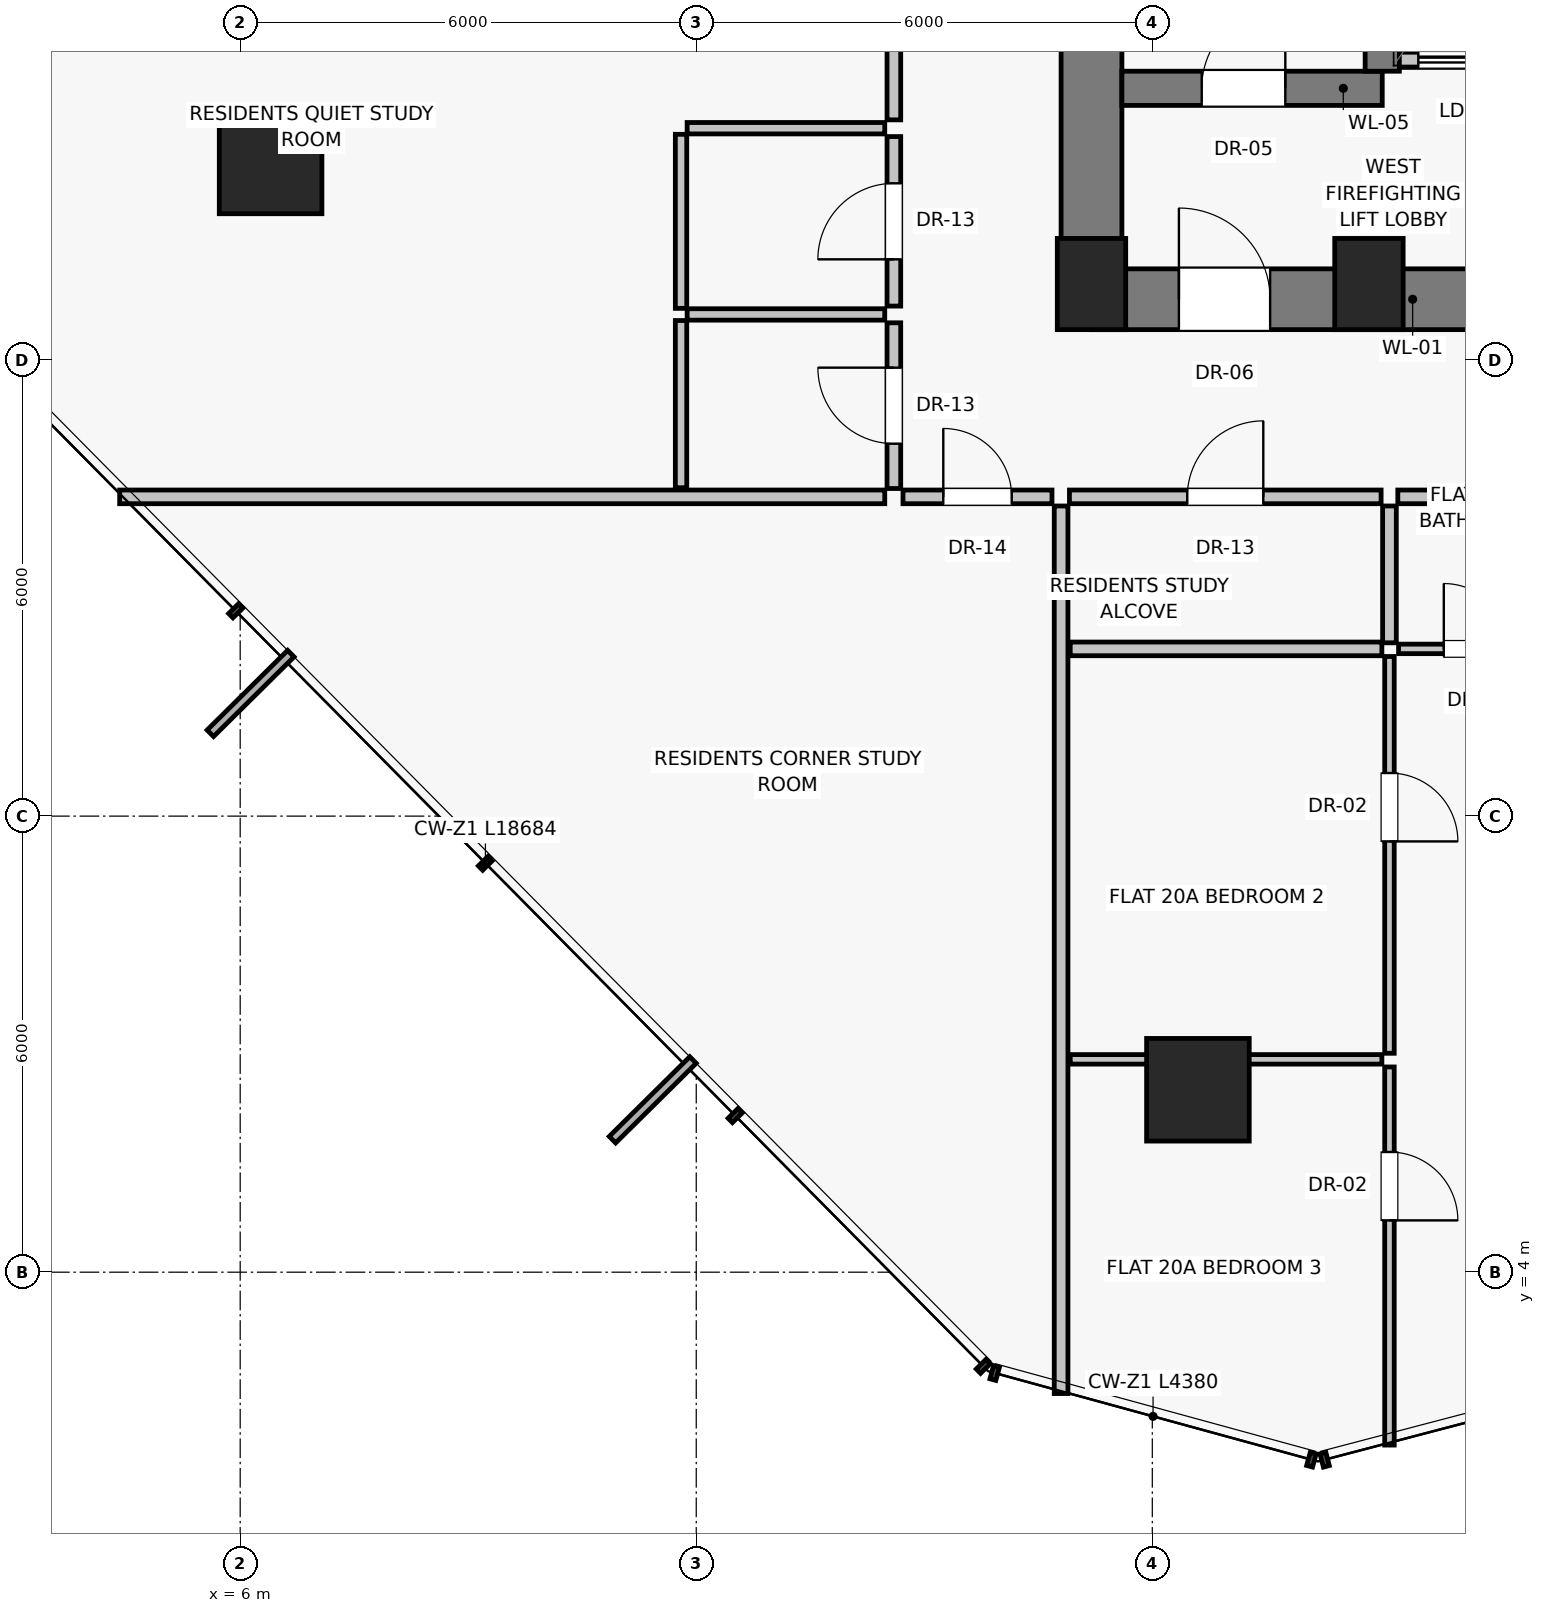
"""IFC4 building model, lengths in metres.
Left out: names, types, materials, properties, quantities, classifications, styles, units other than length and angle.
Written with IfcOpenShell. Run it as: python <this file> out.ifc"""

import sys

from ifc_helpers import new_model, si_unit, direction, frame, frame_2d, origin, origin_2d, place, context, subcontext, project, spatial, rectangle, extrude, source, transform, mapped, element, fill, save


model = new_model("IFC4")
c1 = context("Model", 3, precision=1e-05, world=origin(), true_north=direction((0.0, 1.0)))
c2 = subcontext(c1, "Body", "Model", "MODEL_VIEW")
j1 = project(units=[si_unit("LENGTHUNIT", "METRE"), si_unit("PLANEANGLEUNIT", "RADIAN")], contexts=[c1])
p1 = place(None, origin())
s1 = spatial("IfcSite", under=j1, at=p1, CompositionType="ELEMENT")
p2 = place(p1, origin())
s2 = spatial("IfcBuilding", under=s1, at=p2, CompositionType="ELEMENT")
p3 = place(p2, frame((0.0, 0.0, 73.85)))
s3 = spatial("IfcBuildingStorey", under=s2, at=p3, CompositionType="ELEMENT", Elevation=73.85)
for number, where, z_axis, x_axis in (
    (1, (17.2, 17.0, 0.0), (0.0, 0.0, 1.0), (1.0, 0.0, 0.0)),
    (2, (20.85, 17.0, 0.0), (0.0, 0.0, 1.0), (1.0, 0.0, 0.0)),
):
    element("IfcColumn", number, at=place(p3, frame(where, z_axis=z_axis, x_axis=x_axis)), inside=s3, PredefinedType="PILASTER", context=c2, shape_type="SweptSolid", body=[
        extrude(rectangle(XDim=0.9, YDim=1.2, at=origin_2d()), origin(), (0.0, 0.0, 1.0), 3.25),
    ])
for number, where, z_axis, x_axis in (
    (3, (6.4, 18.6, 0.0), (0.0, 0.0, 1.0), (1.0, 0.0, 0.0)),
    (4, (18.6, 6.4, 0.0), (0.0, 0.0, 1.0), (1.0, 0.0, 0.0)),
):
    element("IfcColumn", number, at=place(p3, frame(where, z_axis=z_axis, x_axis=x_axis)), inside=s3, PredefinedType="COLUMN", context=c2, shape_type="SweptSolid", body=[
        extrude(rectangle(XDim=1.35, YDim=1.35, at=origin_2d()), origin(), (0.0, 0.0, 1.0), 3.25),
    ])
p4 = place(p3, frame((17.2, 16.8, 0.0), z_axis=(0.0, 0.0, 1.0), x_axis=(0.0, 1.0, 0.0)))
e5 = element("IfcWall", 5, at=p4, inside=s3, PredefinedType="SHEAR", context=c2, shape_type="SweptSolid", body=[
    extrude(rectangle(XDim=14.2, YDim=0.8, at=frame_2d((7.1, 0.0))), origin(), (0.0, 0.0, 1.0), 3.0),
])
p5 = place(p3, frame((17.2, 16.8, 0.0), z_axis=(0.0, 0.0, 1.0), x_axis=(1.0, 0.0, 0.0)))
e6 = element("IfcWall", 6, at=p5, inside=s3, PredefinedType="SHEAR", context=c2, shape_type="SweptSolid", body=[
    extrude(rectangle(XDim=5.85, YDim=0.8, at=frame_2d((2.925, 0.0))), origin(), (0.0, 0.0, 1.0), 3.0),
])
p6 = place(p5, frame((1.15, 0.0, 0.0)))
e7 = element("IfcOpeningElement", 7, at=p6, cuts=e6, PredefinedType="OPENING", context=c2, shape_type="SweptSolid", body=[
    extrude(rectangle(XDim=1.2, YDim=2.03, at=frame_2d((0.6, 1.015))), frame((0.0, 0.41, 0.0), z_axis=(0.0, -1.0, 0.0), x_axis=(1.0, 0.0, 0.0)), (0.0, 0.0, 1.0), 0.82),
])
p7 = place(p3, frame((17.6, 19.575, 0.0), z_axis=(0.0, 0.0, 1.0), x_axis=(1.0, 0.0, 0.0)))
e8 = element("IfcWall", 8, at=p7, inside=s3, PredefinedType="SHEAR", context=c2, shape_type="SweptSolid", body=[
    extrude(rectangle(XDim=3.425, YDim=0.45, at=frame_2d((1.712, 0.0))), origin(), (0.0, 0.0, 1.0), 3.0),
])
p8 = place(p7, frame((1.05, 0.0, 0.0)))
e9 = element("IfcOpeningElement", 9, at=p8, cuts=e8, PredefinedType="OPENING", context=c2, shape_type="SweptSolid", body=[
    extrude(rectangle(XDim=1.1, YDim=2.03, at=frame_2d((0.55, 1.015))), frame((0.0, 0.235, 0.0), z_axis=(0.0, -1.0, 0.0), x_axis=(1.0, 0.0, 0.0)), (0.0, 0.0, 1.0), 0.47),
])
p9 = place(p3, frame((21.2, 19.95, 0.0), z_axis=(0.0, 0.0, 1.0), x_axis=(1.0, 0.0, 0.0)))
e10 = element("IfcWall", 10, at=p9, inside=s3, PredefinedType="SOLIDWALL", context=c2, shape_type="SweptSolid", body=[
    extrude(rectangle(XDim=1.85, YDim=0.2, at=frame_2d((0.925, 0.0))), origin(), (0.0, 0.0, 1.0), 3.0),
])
p10 = place(p9, frame((0.3, 0.0, 0.0)))
e11 = element("IfcOpeningElement", 11, at=p10, cuts=e10, PredefinedType="OPENING", context=c2, shape_type="SweptSolid", body=[
    extrude(rectangle(XDim=1.3, YDim=2.25, at=frame_2d((0.65, 1.125))), frame((0.0, 0.11, 0.0), z_axis=(0.0, -1.0, 0.0), x_axis=(1.0, 0.0, 0.0)), (0.0, 0.0, 1.0), 0.22),
])
p11 = place(p3, frame((21.025, 19.8, 0.0), z_axis=(0.0, 0.0, 1.0), x_axis=(0.0, 1.0, 0.0)))
e12 = element("IfcWall", 12, at=p11, inside=s3, PredefinedType="SHEAR", context=c2, shape_type="SweptSolid", body=[
    extrude(rectangle(XDim=8.825, YDim=0.45, at=frame_2d((4.413, 0.0))), origin(), (0.0, 0.0, 1.0), 3.0),
])
p12 = place(p3, frame((16.8, 14.08, 0.0), z_axis=(0.0, 0.0, 1.0), x_axis=(0.0, -1.0, 0.0)))
e13 = element("IfcWall", 13, at=p12, inside=s3, PredefinedType="PARTITIONING", context=c2, shape_type="SweptSolid", body=[
    extrude(rectangle(XDim=11.677, YDim=0.18, at=frame_2d((5.838, 0.0))), origin(), (0.0, 0.0, 1.0), 3.0),
])
p13 = place(p3, frame((16.91, 14.2, 0.0), z_axis=(0.0, 0.0, 1.0), x_axis=(1.0, 0.0, 0.0)))
e14 = element("IfcWall", 14, at=p13, inside=s3, PredefinedType="PARTITIONING", context=c2, shape_type="SweptSolid", body=[
    extrude(rectangle(XDim=4.1, YDim=0.18, at=frame_2d((2.05, 0.0))), origin(), (0.0, 0.0, 1.0), 3.0),
])
p14 = place(p13, frame((1.55, 0.0, 0.0)))
e15 = element("IfcOpeningElement", 15, at=p14, cuts=e14, PredefinedType="OPENING", context=c2, shape_type="SweptSolid", body=[
    extrude(rectangle(XDim=1.0, YDim=2.01, at=frame_2d((0.5, 1.005))), frame((0.0, 0.1, 0.0), z_axis=(0.0, -1.0, 0.0), x_axis=(1.0, 0.0, 0.0)), (0.0, 0.0, 1.0), 0.2),
])
p15 = place(p3, frame((21.23, 14.2, 0.0), z_axis=(0.0, 0.0, 1.0), x_axis=(1.0, 0.0, 0.0)))
e16 = element("IfcWall", 16, at=p15, inside=s3, PredefinedType="PARTITIONING", context=c2, shape_type="SweptSolid", body=[
    extrude(rectangle(XDim=9.86, YDim=0.18, at=frame_2d((4.93, 0.0))), origin(), (0.0, 0.0, 1.0), 3.0),
])
p16 = place(p15, frame((3.276, 0.0, 0.0)))
e17 = element("IfcOpeningElement", 17, at=p16, cuts=e16, PredefinedType="OPENING", context=c2, shape_type="SweptSolid", body=[
    extrude(rectangle(XDim=0.95, YDim=2.02, at=frame_2d((0.475, 1.01))), frame((0.0, 0.1, 0.0), z_axis=(0.0, -1.0, 0.0), x_axis=(1.0, 0.0, 0.0)), (0.0, 0.0, 1.0), 0.2),
])
p17 = place(p3, frame((16.92, 6.8, 0.0), z_axis=(0.0, 0.0, 1.0), x_axis=(1.0, 0.0, 0.0)))
e18 = element("IfcWall", 18, at=p17, inside=s3, PredefinedType="PARTITIONING", context=c2, shape_type="SweptSolid", body=[
    extrude(rectangle(XDim=4.1, YDim=0.125, at=frame_2d((2.05, 0.0))), origin(), (0.0, 0.0, 1.0), 2.1),
])
p18 = place(p3, frame((21.12, 6.7, 0.0), z_axis=(0.0, 0.0, 1.0), x_axis=(0.0, -1.0, 0.0)))
e19 = element("IfcWall", 19, at=p18, inside=s3, PredefinedType="PARTITIONING", context=c2, shape_type="SweptSolid", body=[
    extrude(rectangle(XDim=4.974, YDim=0.125, at=frame_2d((2.487, 0.0))), origin(), (0.0, 0.0, 1.0), 3.0),
])
p19 = place(p18, frame((1.119, 0.0, 0.0)))
e20 = element("IfcOpeningElement", 20, at=p19, cuts=e19, PredefinedType="OPENING", context=c2, shape_type="SweptSolid", body=[
    extrude(rectangle(XDim=0.9, YDim=2.01, at=frame_2d((0.45, 1.005))), frame((0.0, 0.073, 0.0), z_axis=(0.0, -1.0, 0.0), x_axis=(1.0, 0.0, 0.0)), (0.0, 0.0, 1.0), 0.145),
])
p20 = place(p3, frame((16.92, 12.2, 0.0), z_axis=(0.0, 0.0, 1.0), x_axis=(1.0, 0.0, 0.0)))
e21 = element("IfcWall", 21, at=p20, inside=s3, PredefinedType="PARTITIONING", context=c2, shape_type="SweptSolid", body=[
    extrude(rectangle(XDim=4.1, YDim=0.18, at=frame_2d((2.05, 0.0))), origin(), (0.0, 0.0, 1.0), 3.0),
])
p21 = place(p3, frame((21.12, 14.08, 0.0), z_axis=(0.0, 0.0, 1.0), x_axis=(0.0, -1.0, 0.0)))
e22 = element("IfcWall", 22, at=p21, inside=s3, PredefinedType="PARTITIONING", context=c2, shape_type="SweptSolid", body=[
    extrude(rectangle(XDim=1.8, YDim=0.18, at=frame_2d((0.9, 0.0))), origin(), (0.0, 0.0, 1.0), 3.0),
])
p22 = place(p3, frame((21.12, 12.1, 0.0), z_axis=(0.0, 0.0, 1.0), x_axis=(0.0, -1.0, 0.0)))
e23 = element("IfcWall", 23, at=p22, inside=s3, PredefinedType="PARTITIONING", context=c2, shape_type="SweptSolid", body=[
    extrude(rectangle(XDim=5.22, YDim=0.125, at=frame_2d((2.61, 0.0))), origin(), (0.0, 0.0, 1.0), 3.0),
])
p23 = place(p22, frame((1.533, 0.0, 0.0)))
e24 = element("IfcOpeningElement", 24, at=p23, cuts=e23, PredefinedType="OPENING", context=c2, shape_type="SweptSolid", body=[
    extrude(rectangle(XDim=0.9, YDim=2.01, at=frame_2d((0.45, 1.005))), frame((0.0, 0.073, 0.0), z_axis=(0.0, -1.0, 0.0), x_axis=(1.0, 0.0, 0.0)), (0.0, 0.0, 1.0), 0.145),
])
p24 = place(p3, frame((21.24, 12.2, 0.0), z_axis=(0.0, 0.0, 1.0), x_axis=(1.0, 0.0, 0.0)))
e25 = element("IfcWall", 25, at=p24, inside=s3, PredefinedType="PARTITIONING", context=c2, shape_type="SweptSolid", body=[
    extrude(rectangle(XDim=2.05, YDim=0.125, at=frame_2d((1.025, 0.0))), origin(), (0.0, 0.0, 1.0), 3.0),
])
p25 = place(p24, frame((0.595, 0.0, 0.0)))
e26 = element("IfcOpeningElement", 26, at=p25, cuts=e25, PredefinedType="OPENING", context=c2, shape_type="SweptSolid", body=[
    extrude(rectangle(XDim=0.86, YDim=2.01, at=frame_2d((0.43, 1.005))), frame((0.0, 0.073, 0.0), z_axis=(0.0, -1.0, 0.0), x_axis=(1.0, 0.0, 0.0)), (0.0, 0.0, 1.0), 0.145),
])
p26 = place(p3, frame((14.48, 14.2, 0.0), z_axis=(0.0, 0.0, 1.0), x_axis=(-1.0, 0.0, 0.0)))
e27 = element("IfcWall", 27, at=p26, inside=s3, PredefinedType="PARTITIONING", context=c2, shape_type="SweptSolid", body=[
    extrude(rectangle(XDim=10.065, YDim=0.18, at=frame_2d((5.033, 0.0))), origin(), (0.0, 0.0, 1.0), 3.0),
])
p27 = place(p3, frame((14.6, 14.31, 0.0), z_axis=(0.0, 0.0, 1.0), x_axis=(0.0, 1.0, 0.0)))
e28 = element("IfcWall", 28, at=p27, inside=s3, PredefinedType="PARTITIONING", context=c2, shape_type="SweptSolid", body=[
    extrude(rectangle(XDim=2.18, YDim=0.18, at=frame_2d((1.09, 0.0))), origin(), (0.0, 0.0, 1.0), 3.0),
])
p28 = place(p27, frame((0.59, 0.0, 0.0)))
e29 = element("IfcOpeningElement", 29, at=p28, cuts=e28, PredefinedType="OPENING", context=c2, shape_type="SweptSolid", body=[
    extrude(rectangle(XDim=1.0, YDim=2.01, at=frame_2d((0.5, 1.005))), frame((0.0, 0.1, 0.0), z_axis=(0.0, -1.0, 0.0), x_axis=(1.0, 0.0, 0.0)), (0.0, 0.0, 1.0), 0.2),
])
p29 = place(p3, frame((14.6, 16.71, 0.0), z_axis=(0.0, 0.0, 1.0), x_axis=(0.0, 1.0, 0.0)))
e30 = element("IfcWall", 30, at=p29, inside=s3, PredefinedType="PARTITIONING", context=c2, shape_type="SweptSolid", body=[
    extrude(rectangle(XDim=2.23, YDim=0.18, at=frame_2d((1.115, 0.0))), origin(), (0.0, 0.0, 1.0), 3.0),
])
p30 = place(p29, frame((0.615, 0.0, 0.0)))
e31 = element("IfcOpeningElement", 31, at=p30, cuts=e30, PredefinedType="OPENING", context=c2, shape_type="SweptSolid", body=[
    extrude(rectangle(XDim=1.0, YDim=2.01, at=frame_2d((0.5, 1.005))), frame((0.0, 0.1, 0.0), z_axis=(0.0, -1.0, 0.0), x_axis=(1.0, 0.0, 0.0)), (0.0, 0.0, 1.0), 0.2),
])
p31 = place(p3, frame((14.6, 19.16, 0.0), z_axis=(0.0, 0.0, 1.0), x_axis=(0.0, 1.0, 0.0)))
e32 = element("IfcWall", 32, at=p31, inside=s3, PredefinedType="PARTITIONING", context=c2, shape_type="SweptSolid", body=[
    extrude(rectangle(XDim=4.73, YDim=0.18, at=frame_2d((2.365, 0.0))), origin(), (0.0, 0.0, 1.0), 3.0),
])
p32 = place(p31, frame((1.865, 0.0, 0.0)))
e33 = element("IfcOpeningElement", 33, at=p32, cuts=e32, PredefinedType="OPENING", context=c2, shape_type="SweptSolid", body=[
    extrude(rectangle(XDim=1.0, YDim=2.01, at=frame_2d((0.5, 1.005))), frame((0.0, 0.1, 0.0), z_axis=(0.0, -1.0, 0.0), x_axis=(1.0, 0.0, 0.0)), (0.0, 0.0, 1.0), 0.2),
])
for number, where, z_axis, x_axis in (
    (34, (14.48, 16.6, 0.0), (0.0, 0.0, 1.0), (-1.0, 0.0, 0.0)),
    (35, (14.48, 19.05, 0.0), (0.0, 0.0, 1.0), (-1.0, 0.0, 0.0)),
):
    element("IfcWall", number, at=place(p3, frame(where, z_axis=z_axis, x_axis=x_axis)), inside=s3, PredefinedType="PARTITIONING", context=c2, shape_type="SweptSolid", body=[
        extrude(rectangle(XDim=2.6, YDim=0.15, at=frame_2d((1.3, 0.0))), origin(), (0.0, 0.0, 1.0), 3.0),
    ])
p33 = place(p3, frame((11.8, 14.32, 0.0), z_axis=(0.0, 0.0, 1.0), x_axis=(0.0, 1.0, 0.0)))
e36 = element("IfcWall", 36, at=p33, inside=s3, PredefinedType="PARTITIONING", context=c2, shape_type="SweptSolid", body=[
    extrude(rectangle(XDim=2.2, YDim=0.15, at=frame_2d((1.1, 0.0))), origin(), (0.0, 0.0, 1.0), 3.0),
])
p34 = place(p3, frame((11.8, 16.68, 0.0), z_axis=(0.0, 0.0, 1.0), x_axis=(0.0, 1.0, 0.0)))
e37 = element("IfcWall", 37, at=p34, inside=s3, PredefinedType="PARTITIONING", context=c2, shape_type="SweptSolid", body=[
    extrude(rectangle(XDim=2.29, YDim=0.15, at=frame_2d((1.145, 0.0))), origin(), (0.0, 0.0, 1.0), 2.58),
])
p35 = place(p3, frame((14.72, 14.2, 0.0), z_axis=(0.0, 0.0, 1.0), x_axis=(1.0, 0.0, 0.0)))
e38 = element("IfcWall", 38, at=p35, inside=s3, PredefinedType="PARTITIONING", context=c2, shape_type="SweptSolid", body=[
    extrude(rectangle(XDim=1.96, YDim=0.18, at=frame_2d((0.98, 0.0))), origin(), (0.0, 0.0, 1.0), 3.0),
])
p36 = place(p35, frame((0.53, 0.0, 0.0)))
e39 = element("IfcOpeningElement", 39, at=p36, cuts=e38, PredefinedType="OPENING", context=c2, shape_type="SweptSolid", body=[
    extrude(rectangle(XDim=0.9, YDim=2.01, at=frame_2d((0.45, 1.005))), frame((0.0, 0.1, 0.0), z_axis=(0.0, -1.0, 0.0), x_axis=(1.0, 0.0, 0.0)), (0.0, 0.0, 1.0), 0.2),
])
m1 = source(origin(), c2, "Body", "SweptSolid", [
    extrude(rectangle(XDim=1.2, YDim=2.03, at=frame_2d((0.6, 1.015))), frame((0.0, 0.025, 0.0), z_axis=(0.0, -1.0, 0.0), x_axis=(1.0, 0.0, 0.0)), (0.0, 0.0, 1.0), 0.05),
])
p37 = place(p6, origin())
e40 = element("IfcDoor", 40, at=p37, inside=s3, OperationType="SINGLE_SWING_LEFT", PredefinedType="DOOR", context=c2, shape_type="MappedRepresentation", body=[
    mapped(m1, transform((0.0, 0.0, 0.0), scale=1.0)),
])
fill(e7, e40)
m2 = source(origin(), c2, "Body", "SweptSolid", [
    extrude(rectangle(XDim=1.1, YDim=2.03, at=frame_2d((0.55, 1.015))), frame((0.0, 0.025, 0.0), z_axis=(0.0, -1.0, 0.0), x_axis=(1.0, 0.0, 0.0)), (0.0, 0.0, 1.0), 0.05),
])
p38 = place(p8, origin())
e41 = element("IfcDoor", 41, at=p38, inside=s3, OperationType="SINGLE_SWING_RIGHT", PredefinedType="DOOR", context=c2, shape_type="MappedRepresentation", body=[
    mapped(m2, transform((0.0, 0.0, 0.0), scale=1.0)),
])
fill(e9, e41)
m3 = source(origin(), c2, "Body", "SweptSolid", [
    extrude(rectangle(XDim=1.3, YDim=2.25, at=frame_2d((0.65, 1.125))), frame((0.0, 0.025, 0.0), z_axis=(0.0, -1.0, 0.0), x_axis=(1.0, 0.0, 0.0)), (0.0, 0.0, 1.0), 0.05),
])
p39 = place(p10, origin())
e42 = element("IfcDoor", 42, at=p39, inside=s3, OperationType="SLIDING_TO_LEFT", PredefinedType="DOOR", context=c2, shape_type="MappedRepresentation", body=[
    mapped(m3, transform((0.0, 0.0, 0.0), scale=1.0)),
])
fill(e11, e42)
m4 = source(origin(), c2, "Body", "SweptSolid", [
    extrude(rectangle(XDim=1.0, YDim=2.01, at=frame_2d((0.5, 1.005))), frame((0.0, 0.025, 0.0), z_axis=(0.0, -1.0, 0.0), x_axis=(1.0, 0.0, 0.0)), (0.0, 0.0, 1.0), 0.05),
])
p40 = place(p14, origin())
e43 = element("IfcDoor", 43, at=p40, inside=s3, OperationType="SINGLE_SWING_RIGHT", PredefinedType="DOOR", context=c2, shape_type="MappedRepresentation", body=[
    mapped(m4, transform((0.0, 0.0, 0.0), scale=1.0)),
])
fill(e15, e43)
m5 = source(origin(), c2, "Body", "SweptSolid", [
    extrude(rectangle(XDim=0.9, YDim=2.01, at=frame_2d((0.45, 1.005))), frame((0.0, 0.025, 0.0), z_axis=(0.0, -1.0, 0.0), x_axis=(1.0, 0.0, 0.0)), (0.0, 0.0, 1.0), 0.05),
])
p41 = place(p19, origin())
e44 = element("IfcDoor", 44, at=p41, inside=s3, OperationType="SINGLE_SWING_RIGHT", PredefinedType="DOOR", context=c2, shape_type="MappedRepresentation", body=[
    mapped(m5, transform((0.0, 0.0, 0.0), scale=1.0)),
])
fill(e20, e44)
p42 = place(p23, origin())
e45 = element("IfcDoor", 45, at=p42, inside=s3, OperationType="SINGLE_SWING_RIGHT", PredefinedType="DOOR", context=c2, shape_type="MappedRepresentation", body=[
    mapped(m5, transform((0.0, 0.0, 0.0), scale=1.0)),
])
fill(e24, e45)
m6 = source(origin(), c2, "Body", "SweptSolid", [
    extrude(rectangle(XDim=0.86, YDim=2.01, at=frame_2d((0.43, 1.005))), frame((0.0, 0.025, 0.0), z_axis=(0.0, -1.0, 0.0), x_axis=(1.0, 0.0, 0.0)), (0.0, 0.0, 1.0), 0.05),
])
p43 = place(p25, origin())
e46 = element("IfcDoor", 46, at=p43, inside=s3, OperationType="SINGLE_SWING_LEFT", PredefinedType="DOOR", context=c2, shape_type="MappedRepresentation", body=[
    mapped(m6, transform((0.0, 0.0, 0.0), scale=1.0)),
])
fill(e26, e46)
p44 = place(p28, origin())
e47 = element("IfcDoor", 47, at=p44, inside=s3, OperationType="SINGLE_SWING_RIGHT", PredefinedType="DOOR", context=c2, shape_type="MappedRepresentation", body=[
    mapped(m4, transform((0.0, 0.0, 0.0), scale=1.0)),
])
fill(e29, e47)
p45 = place(p30, origin())
e48 = element("IfcDoor", 48, at=p45, inside=s3, OperationType="SINGLE_SWING_LEFT", PredefinedType="DOOR", context=c2, shape_type="MappedRepresentation", body=[
    mapped(m4, transform((0.0, 0.0, 0.0), scale=1.0)),
])
fill(e31, e48)
p46 = place(p36, origin())
e49 = element("IfcDoor", 49, at=p46, inside=s3, OperationType="SINGLE_SWING_LEFT", PredefinedType="DOOR", context=c2, shape_type="MappedRepresentation", body=[
    mapped(m5, transform((0.0, 0.0, 0.0), scale=1.0)),
])
fill(e39, e49)
save(model, sys.argv[1])
